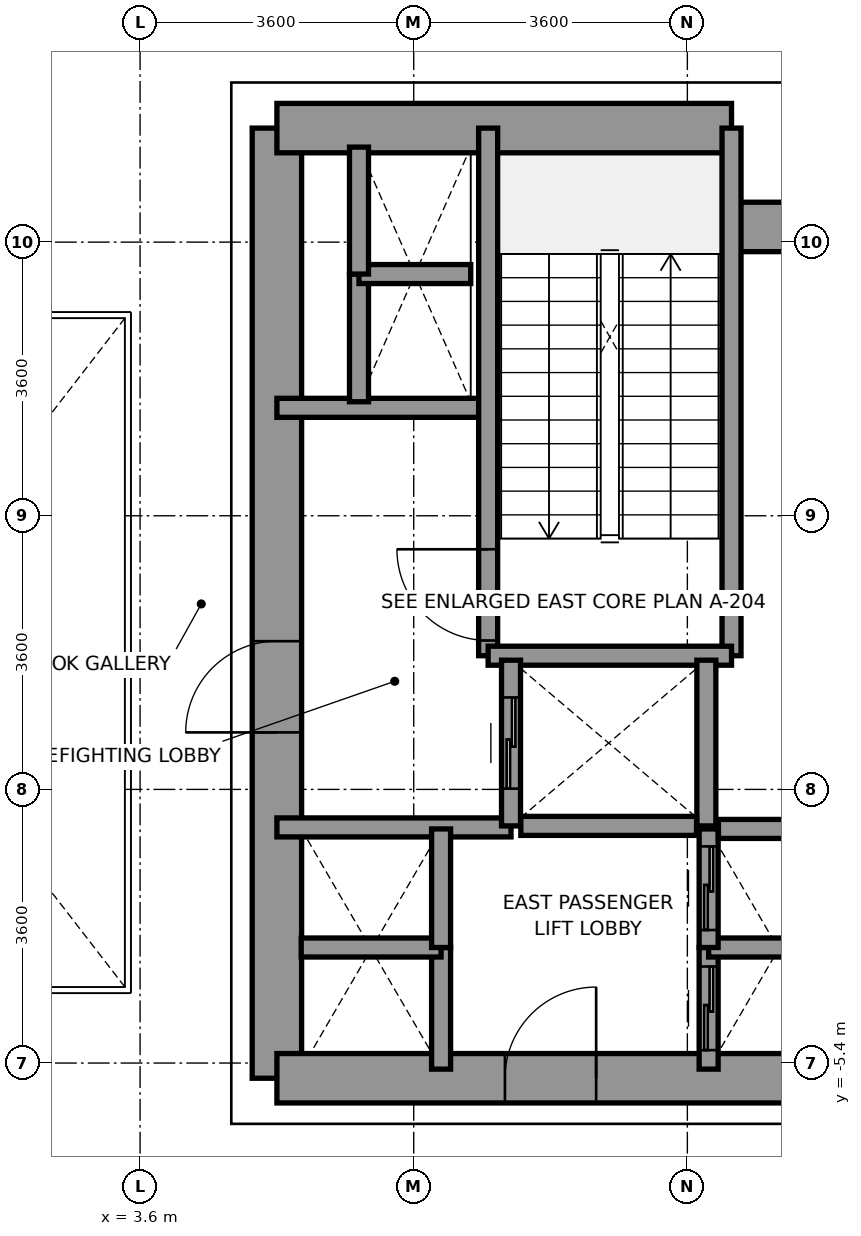
"""IFC4 building model, lengths in metres.
Left out: names, types, materials, properties, quantities, classifications, styles, units other than length and angle.
Written with IfcOpenShell. Run it as: python <this file> out.ifc"""

import sys

from ifc_helpers import new_model, si_unit, direction, frame, frame_2d, origin, place, context, subcontext, project, spatial, rectangle, extrude, source, transform, mapped, element, fill, save


model = new_model("IFC4")
c1 = context("Model", 3, precision=1e-05, world=origin(), true_north=direction((0.0, 1.0)))
c2 = subcontext(c1, "Body", "Model", "MODEL_VIEW")
j1 = project(units=[si_unit("LENGTHUNIT", "METRE"), si_unit("PLANEANGLEUNIT", "RADIAN")], contexts=[c1])
p1 = place(None, origin())
s1 = spatial("IfcSite", under=j1, at=p1, CompositionType="ELEMENT")
p2 = place(p1, origin())
s2 = spatial("IfcBuilding", under=s1, at=p2, CompositionType="ELEMENT")
p3 = place(p2, frame((0.0, 0.0, 15.6)))
s3 = spatial("IfcBuildingStorey", under=s2, at=p3, CompositionType="ELEMENT", Elevation=15.6)
p4 = place(p3, frame((5.4, -5.6, 0.0), z_axis=(0.0, 0.0, 1.0), x_axis=(0.0, 1.0, 0.0)))
e1 = element("IfcWall", 1, at=p4, inside=s3, PredefinedType="SHEAR", context=c2, shape_type="SweptSolid", body=[
    extrude(rectangle(XDim=12.5, YDim=0.65, at=frame_2d((6.25, 0.0))), origin(), (0.0, 0.0, 1.0), 4.55),
])
p5 = place(p4, frame((4.55, 0.0, 0.0)))
e2 = element("IfcOpeningElement", 2, at=p5, cuts=e1, PredefinedType="OPENING", context=c2, shape_type="SweptSolid", body=[
    extrude(rectangle(XDim=1.2, YDim=2.2, at=frame_2d((0.6, 1.1))), frame((0.0, 0.335, 0.0), z_axis=(0.0, -1.0, 0.0), x_axis=(1.0, 0.0, 0.0)), (0.0, 0.0, 1.0), 0.67),
])
p6 = place(p3, frame((5.4, 6.9, 0.0), z_axis=(0.0, 0.0, 1.0), x_axis=(1.0, 0.0, 0.0)))
e3 = element("IfcWall", 3, at=p6, inside=s3, PredefinedType="SHEAR", context=c2, shape_type="SweptSolid", body=[
    extrude(rectangle(XDim=5.981, YDim=0.65, at=frame_2d((2.991, 0.0))), origin(), (0.0, 0.0, 1.0), 4.55),
])
p7 = place(p3, frame((11.381, 5.6, 0.0), z_axis=(0.0, 0.0, 1.0), x_axis=(1.0, 0.0, 0.0)))
e4 = element("IfcWall", 4, at=p7, inside=s3, PredefinedType="SHEAR", context=c2, shape_type="SweptSolid", body=[
    extrude(rectangle(XDim=1.819, YDim=0.65, at=frame_2d((0.909, 0.0))), origin(), (0.0, 0.0, 1.0), 4.55),
])
p8 = place(p3, frame((5.4, -5.6, 0.0), z_axis=(0.0, 0.0, 1.0), x_axis=(1.0, 0.0, 0.0)))
e5 = element("IfcWall", 5, at=p8, inside=s3, PredefinedType="SHEAR", context=c2, shape_type="SweptSolid", body=[
    extrude(rectangle(XDim=7.8, YDim=0.65, at=frame_2d((3.9, 0.0))), origin(), (0.0, 0.0, 1.0), 4.55),
])
p9 = place(p8, frame((3.0, 0.0, 0.0)))
e6 = element("IfcOpeningElement", 6, at=p9, cuts=e5, PredefinedType="OPENING", context=c2, shape_type="SweptSolid", body=[
    extrude(rectangle(XDim=1.2, YDim=2.2, at=frame_2d((0.6, 1.1))), frame((0.0, 0.335, 0.0), z_axis=(0.0, -1.0, 0.0), x_axis=(1.0, 0.0, 0.0)), (0.0, 0.0, 1.0), 0.67),
])
p10 = place(p3, frame((5.4, 3.22, 0.0), z_axis=(0.0, 0.0, 1.0), x_axis=(1.0, 0.0, 0.0)))
e7 = element("IfcWall", 7, at=p10, inside=s3, PredefinedType="SOLIDWALL", context=c2, shape_type="SweptSolid", body=[
    extrude(rectangle(XDim=2.78, YDim=0.25, at=frame_2d((1.39, 0.0))), origin(), (0.0, 0.0, 1.0), 4.55),
])
p11 = place(p3, frame((5.4, -2.3, 0.0), z_axis=(0.0, 0.0, 1.0), x_axis=(1.0, 0.0, 0.0)))
e8 = element("IfcWall", 8, at=p11, inside=s3, PredefinedType="SOLIDWALL", context=c2, shape_type="SweptSolid", body=[
    extrude(rectangle(XDim=3.08, YDim=0.25, at=frame_2d((1.54, 0.0))), origin(), (0.0, 0.0, 1.0), 4.55),
])
p12 = place(p3, frame((8.179, -0.041, 0.0), z_axis=(0.0, 0.0, 1.0), x_axis=(0.0, 1.0, 0.0)))
e9 = element("IfcWall", 9, at=p12, inside=s3, PredefinedType="SOLIDWALL", context=c2, shape_type="SweptSolid", body=[
    extrude(rectangle(XDim=6.941, YDim=0.25, at=frame_2d((3.47, 0.0))), origin(), (0.0, 0.0, 1.0), 4.55),
])
p13 = place(p12, frame((0.2, 0.0, 0.0)))
e10 = element("IfcOpeningElement", 10, at=p13, cuts=e9, PredefinedType="OPENING", context=c2, shape_type="SweptSolid", body=[
    extrude(rectangle(XDim=1.2, YDim=2.2, at=frame_2d((0.6, 1.1))), frame((0.0, 0.135, 0.0), z_axis=(0.0, -1.0, 0.0), x_axis=(1.0, 0.0, 0.0)), (0.0, 0.0, 1.0), 0.27),
])
p14 = place(p3, frame((11.381, -0.041, 0.0), z_axis=(0.0, 0.0, 1.0), x_axis=(0.0, 1.0, 0.0)))
e11 = element("IfcWall", 11, at=p14, inside=s3, PredefinedType="SOLIDWALL", context=c2, shape_type="SweptSolid", body=[
    extrude(rectangle(XDim=6.941, YDim=0.25, at=frame_2d((3.47, 0.0))), origin(), (0.0, 0.0, 1.0), 4.55),
])
p15 = place(p3, frame((8.179, -0.041, 0.0), z_axis=(0.0, 0.0, 1.0), x_axis=(1.0, 0.0, 0.0)))
e12 = element("IfcWall", 12, at=p15, inside=s3, PredefinedType="SOLIDWALL", context=c2, shape_type="SweptSolid", body=[
    extrude(rectangle(XDim=3.202, YDim=0.25, at=frame_2d((1.601, 0.0))), origin(), (0.0, 0.0, 1.0), 4.55),
])
p16 = place(p3, frame((8.48, -2.28, 0.0), z_axis=(0.0, 0.0, 1.0), x_axis=(0.0, 1.0, 0.0)))
e13 = element("IfcWall", 13, at=p16, inside=s3, PredefinedType="SOLIDWALL", context=c2, shape_type="SweptSolid", body=[
    extrude(rectangle(XDim=2.18, YDim=0.25, at=frame_2d((1.09, 0.0))), origin(), (0.0, 0.0, 1.0), 4.55),
])
p17 = place(p16, frame((0.49, 0.0, 0.0)))
e14 = element("IfcOpeningElement", 14, at=p17, cuts=e13, PredefinedType="OPENING", context=c2, shape_type="SweptSolid", body=[
    extrude(rectangle(XDim=1.2, YDim=2.2, at=frame_2d((0.6, 1.1))), frame((0.0, 0.135, 0.0), z_axis=(0.0, -1.0, 0.0), x_axis=(1.0, 0.0, 0.0)), (0.0, 0.0, 1.0), 0.27),
])
p18 = place(p3, frame((11.05, -2.28, 0.0), z_axis=(0.0, 0.0, 1.0), x_axis=(0.0, 1.0, 0.0)))
e15 = element("IfcWall", 15, at=p18, inside=s3, PredefinedType="SOLIDWALL", context=c2, shape_type="SweptSolid", body=[
    extrude(rectangle(XDim=2.18, YDim=0.25, at=frame_2d((1.09, 0.0))), origin(), (0.0, 0.0, 1.0), 4.55),
])
p19 = place(p3, frame((8.609, -2.28, 0.0), z_axis=(0.0, 0.0, 1.0), x_axis=(1.0, 0.0, 0.0)))
e16 = element("IfcWall", 16, at=p19, inside=s3, PredefinedType="SOLIDWALL", context=c2, shape_type="SweptSolid", body=[
    extrude(rectangle(XDim=2.312, YDim=0.25, at=frame_2d((1.156, 0.0))), origin(), (0.0, 0.0, 1.0), 4.55),
])
p20 = place(p3, frame((11.08, -5.48, 0.0), z_axis=(0.0, 0.0, 1.0), x_axis=(0.0, 1.0, 0.0)))
e17 = element("IfcWall", 17, at=p20, inside=s3, PredefinedType="SOLIDWALL", context=c2, shape_type="SweptSolid", body=[
    extrude(rectangle(XDim=1.6, YDim=0.25, at=frame_2d((0.8, 0.0))), origin(), (0.0, 0.0, 1.0), 4.55),
])
p21 = place(p20, frame((0.25, 0.0, 0.0)))
e18 = element("IfcOpeningElement", 18, at=p21, cuts=e17, PredefinedType="OPENING", context=c2, shape_type="SweptSolid", body=[
    extrude(rectangle(XDim=1.1, YDim=2.2, at=frame_2d((0.55, 1.1))), frame((0.0, 0.135, 0.0), z_axis=(0.0, -1.0, 0.0), x_axis=(1.0, 0.0, 0.0)), (0.0, 0.0, 1.0), 0.27),
])
p22 = place(p3, frame((11.08, -3.88, 0.0), z_axis=(0.0, 0.0, 1.0), x_axis=(1.0, 0.0, 0.0)))
e19 = element("IfcWall", 19, at=p22, inside=s3, PredefinedType="SOLIDWALL", context=c2, shape_type="SweptSolid", body=[
    extrude(rectangle(XDim=1.84, YDim=0.25, at=frame_2d((0.92, 0.0))), origin(), (0.0, 0.0, 1.0), 4.55),
])
p23 = place(p3, frame((11.08, -3.88, 0.0), z_axis=(0.0, 0.0, 1.0), x_axis=(0.0, 1.0, 0.0)))
e20 = element("IfcWall", 20, at=p23, inside=s3, PredefinedType="SOLIDWALL", context=c2, shape_type="SweptSolid", body=[
    extrude(rectangle(XDim=1.56, YDim=0.25, at=frame_2d((0.78, 0.0))), origin(), (0.0, 0.0, 1.0), 4.55),
])
p24 = place(p23, frame((0.23, 0.0, 0.0)))
e21 = element("IfcOpeningElement", 21, at=p24, cuts=e20, PredefinedType="OPENING", context=c2, shape_type="SweptSolid", body=[
    extrude(rectangle(XDim=1.1, YDim=2.2, at=frame_2d((0.55, 1.1))), frame((0.0, 0.135, 0.0), z_axis=(0.0, -1.0, 0.0), x_axis=(1.0, 0.0, 0.0)), (0.0, 0.0, 1.0), 0.27),
])
p25 = place(p3, frame((11.209, -2.32, 0.0), z_axis=(0.0, 0.0, 1.0), x_axis=(1.0, 0.0, 0.0)))
e22 = element("IfcWall", 22, at=p25, inside=s3, PredefinedType="SOLIDWALL", context=c2, shape_type="SweptSolid", body=[
    extrude(rectangle(XDim=1.582, YDim=0.25, at=frame_2d((0.791, 0.0))), origin(), (0.0, 0.0, 1.0), 4.55),
])
p26 = place(p3, frame((7.56, -5.48, 0.0), z_axis=(0.0, 0.0, 1.0), x_axis=(0.0, 1.0, 0.0)))
e23 = element("IfcWall", 23, at=p26, inside=s3, PredefinedType="SOLIDWALL", context=c2, shape_type="SweptSolid", body=[
    extrude(rectangle(XDim=1.6, YDim=0.25, at=frame_2d((0.8, 0.0))), origin(), (0.0, 0.0, 1.0), 4.55),
])
p27 = place(p3, frame((5.72, -3.88, 0.0), z_axis=(0.0, 0.0, 1.0), x_axis=(1.0, 0.0, 0.0)))
e24 = element("IfcWall", 24, at=p27, inside=s3, PredefinedType="SOLIDWALL", context=c2, shape_type="SweptSolid", body=[
    extrude(rectangle(XDim=1.84, YDim=0.25, at=frame_2d((0.92, 0.0))), origin(), (0.0, 0.0, 1.0), 4.55),
])
p28 = place(p3, frame((7.56, -3.88, 0.0), z_axis=(0.0, 0.0, 1.0), x_axis=(0.0, 1.0, 0.0)))
e25 = element("IfcWall", 25, at=p28, inside=s3, PredefinedType="SOLIDWALL", context=c2, shape_type="SweptSolid", body=[
    extrude(rectangle(XDim=1.56, YDim=0.25, at=frame_2d((0.78, 0.0))), origin(), (0.0, 0.0, 1.0), 4.55),
])
p29 = place(p3, frame((6.48, 3.3, 0.0), z_axis=(0.0, 0.0, 1.0), x_axis=(0.0, 1.0, 0.0)))
e26 = element("IfcWall", 26, at=p29, inside=s3, PredefinedType="SOLIDWALL", context=c2, shape_type="SweptSolid", body=[
    extrude(rectangle(XDim=1.68, YDim=0.25, at=frame_2d((0.84, 0.0))), origin(), (0.0, 0.0, 1.0), 4.55),
])
p30 = place(p3, frame((6.48, 4.98, 0.0), z_axis=(0.0, 0.0, 1.0), x_axis=(1.0, 0.0, 0.0)))
e27 = element("IfcWall", 27, at=p30, inside=s3, PredefinedType="SOLIDWALL", context=c2, shape_type="SweptSolid", body=[
    extrude(rectangle(XDim=1.47, YDim=0.25, at=frame_2d((0.735, 0.0))), origin(), (0.0, 0.0, 1.0), 4.55),
])
p31 = place(p3, frame((6.48, 4.98, 0.0), z_axis=(0.0, 0.0, 1.0), x_axis=(0.0, 1.0, 0.0)))
e28 = element("IfcWall", 28, at=p31, inside=s3, PredefinedType="SOLIDWALL", context=c2, shape_type="SweptSolid", body=[
    extrude(rectangle(XDim=1.67, YDim=0.25, at=frame_2d((0.835, 0.0))), origin(), (0.0, 0.0, 1.0), 4.55),
])
m1 = source(origin(), c2, "Body", "SweptSolid", [
    extrude(rectangle(XDim=1.2, YDim=2.2, at=frame_2d((0.6, 1.1))), frame((0.0, 0.025, 0.0), z_axis=(0.0, -1.0, 0.0), x_axis=(1.0, 0.0, 0.0)), (0.0, 0.0, 1.0), 0.05),
])
p32 = place(p13, origin())
e29 = element("IfcDoor", 29, at=p32, inside=s3, OperationType="SINGLE_SWING_RIGHT", PredefinedType="DOOR", context=c2, shape_type="MappedRepresentation", body=[
    mapped(m1, transform((0.0, 0.0, 0.0), x_axis=(1.0, 0.0, 0.0), y_axis=(0.0, 1.0, 0.0), z_axis=(0.0, 0.0, 1.0), scale=1.0)),
])
fill(e10, e29)
p33 = place(p5, origin())
e30 = element("IfcDoor", 30, at=p33, inside=s3, OperationType="SINGLE_SWING_LEFT", PredefinedType="DOOR", context=c2, shape_type="MappedRepresentation", body=[
    mapped(m1, transform((0.0, 0.0, 0.0), x_axis=(1.0, 0.0, 0.0), y_axis=(0.0, 1.0, 0.0), z_axis=(0.0, 0.0, 1.0), scale=1.0)),
])
fill(e2, e30)
p34 = place(p9, origin())
e31 = element("IfcDoor", 31, at=p34, inside=s3, OperationType="SINGLE_SWING_RIGHT", PredefinedType="DOOR", context=c2, shape_type="MappedRepresentation", body=[
    mapped(m1, transform((0.0, 0.0, 0.0), x_axis=(1.0, 0.0, 0.0), y_axis=(0.0, 1.0, 0.0), z_axis=(0.0, 0.0, 1.0), scale=1.0)),
])
fill(e6, e31)
p35 = place(p17, origin())
e32 = element("IfcDoor", 32, at=p35, inside=s3, OperationType="SLIDING_TO_RIGHT", PredefinedType="DOOR", context=c2, shape_type="MappedRepresentation", body=[
    mapped(m1, transform((0.0, 0.0, 0.0), x_axis=(1.0, 0.0, 0.0), y_axis=(0.0, 1.0, 0.0), z_axis=(0.0, 0.0, 1.0), scale=1.0)),
])
fill(e14, e32)
m2 = source(origin(), c2, "Body", "SweptSolid", [
    extrude(rectangle(XDim=1.1, YDim=2.2, at=frame_2d((0.55, 1.1))), frame((0.0, 0.025, 0.0), z_axis=(0.0, -1.0, 0.0), x_axis=(1.0, 0.0, 0.0)), (0.0, 0.0, 1.0), 0.05),
])
p36 = place(p21, origin())
e33 = element("IfcDoor", 33, at=p36, inside=s3, OperationType="SLIDING_TO_LEFT", PredefinedType="DOOR", context=c2, shape_type="MappedRepresentation", body=[
    mapped(m2, transform((0.0, 0.0, 0.0), x_axis=(1.0, 0.0, 0.0), y_axis=(0.0, 1.0, 0.0), z_axis=(0.0, 0.0, 1.0), scale=1.0)),
])
fill(e18, e33)
p37 = place(p24, origin())
e34 = element("IfcDoor", 34, at=p37, inside=s3, OperationType="SLIDING_TO_LEFT", PredefinedType="DOOR", context=c2, shape_type="MappedRepresentation", body=[
    mapped(m2, transform((0.0, 0.0, 0.0), x_axis=(1.0, 0.0, 0.0), y_axis=(0.0, 1.0, 0.0), z_axis=(0.0, 0.0, 1.0), scale=1.0)),
])
fill(e21, e34)
save(model, sys.argv[1])
